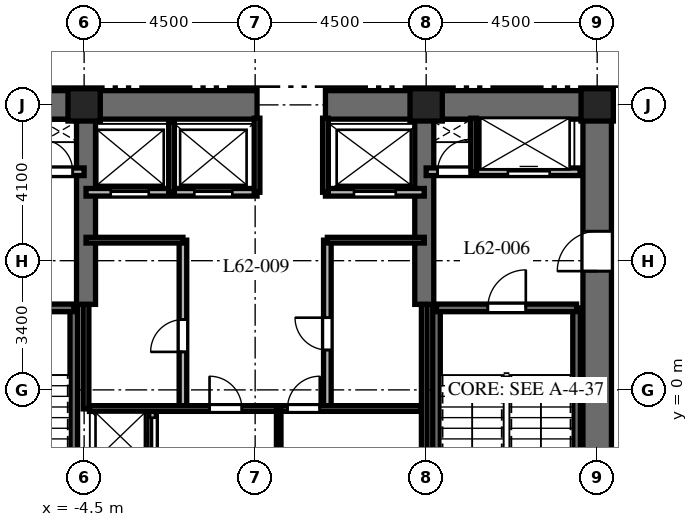
"""IFC4 building model, lengths in metres.
Left out: names, types, materials, properties, quantities, classifications, styles, units other than length and angle.
Written with IfcOpenShell. Run it as: python <this file> out.ifc"""

import sys

from ifc_helpers import new_model, si_unit, direction, frame, frame_2d, origin, origin_2d, place, context, subcontext, project, spatial, rectangle, extrude, element, fill, save


model = new_model("IFC4")
c1 = context("Model", 3, precision=1e-05, world=origin(), true_north=direction((0.0, 1.0)))
c2 = subcontext(c1, "Body", "Model", "MODEL_VIEW")
j1 = project(units=[si_unit("LENGTHUNIT", "METRE"), si_unit("PLANEANGLEUNIT", "RADIAN")], contexts=[c1])
p1 = place(None, origin())
s1 = spatial("IfcSite", under=j1, at=p1, CompositionType="ELEMENT")
p2 = place(p1, origin())
s2 = spatial("IfcBuilding", under=s1, at=p2, CompositionType="ELEMENT")
p3 = place(p2, frame((0.0, 0.0, 248.3)))
s3 = spatial("IfcBuildingStorey", under=s2, at=p3, CompositionType="ELEMENT", Elevation=248.3)
p4 = place(p3, frame((-9.375, 7.5, 0.0), z_axis=(0.0, 0.0, 1.0), x_axis=(1.0, 0.0, 0.0)))
e1 = element("IfcWall", 1, at=p4, inside=s3, PredefinedType="SHEAR", context=c2, shape_type="SweptSolid", body=[
    extrude(rectangle(XDim=9.425, YDim=0.75, at=frame_2d((4.712, 0.0))), origin(), (0.0, 0.0, 1.0), 3.8),
])
p5 = place(p3, frame((1.85, 7.5, 0.0), z_axis=(0.0, 0.0, 1.0), x_axis=(1.0, 0.0, 0.0)))
e2 = element("IfcWall", 2, at=p5, inside=s3, PredefinedType="SHEAR", context=c2, shape_type="SweptSolid", body=[
    extrude(rectangle(XDim=7.525, YDim=0.75, at=frame_2d((3.762, 0.0))), origin(), (0.0, 0.0, 1.0), 3.8),
])
p6 = place(p3, frame((9.0, -7.125, 0.0), z_axis=(0.0, 0.0, 1.0), x_axis=(0.0, 1.0, 0.0)))
e3 = element("IfcWall", 3, at=p6, inside=s3, PredefinedType="SHEAR", context=c2, shape_type="SweptSolid", body=[
    extrude(rectangle(XDim=14.25, YDim=0.75, at=frame_2d((7.125, 0.0))), origin(), (0.0, 0.0, 1.0), 3.8),
])
p7 = place(p6, frame((10.25, 0.0, 0.0)))
e4 = element("IfcOpeningElement", 4, at=p7, cuts=e3, PredefinedType="OPENING", context=c2, shape_type="SweptSolid", body=[
    extrude(rectangle(XDim=1.05, YDim=2.15, at=frame_2d((0.525, 1.075))), frame((0.0, 0.385, 0.0), z_axis=(0.0, -1.0, 0.0), x_axis=(1.0, 0.0, 0.0)), (0.0, 0.0, 1.0), 0.77),
])
for number, where, z_axis, x_axis in (
    (5, (-4.45, 2.25, 0.0), (0.0, 0.0, 1.0), (0.0, 1.0, 0.0)),
    (6, (4.45, 2.25, 0.0), (0.0, 0.0, 1.0), (0.0, 1.0, 0.0)),
):
    element("IfcWall", number, at=place(p3, frame(where, z_axis=z_axis, x_axis=x_axis)), inside=s3, PredefinedType="SHEAR", context=c2, shape_type="SweptSolid", body=[
        extrude(rectangle(XDim=4.875, YDim=0.5, at=frame_2d((2.438, 0.0))), origin(), (0.0, 0.0, 1.0), 3.8),
    ])
p8 = place(p3, frame((-4.772, -6.985, 0.0), z_axis=(0.0, 0.0, 1.0), x_axis=(0.0, 1.0, 0.0)))
e7 = element("IfcWall", 7, at=p8, inside=s3, PredefinedType="SHEAR", context=c2, shape_type="SweptSolid", body=[
    extrude(rectangle(XDim=9.143, YDim=0.2, at=frame_2d((4.572, 0.0))), origin(), (0.0, 0.0, 1.0), 3.8),
])
p9 = place(p3, frame((-8.458, 2.158, 0.0), z_axis=(0.0, 0.0, 1.0), x_axis=(1.0, 0.0, 0.0)))
e8 = element("IfcWall", 8, at=p9, inside=s3, PredefinedType="SHEAR", context=c2, shape_type="SweptSolid", body=[
    extrude(rectangle(XDim=3.686, YDim=0.2, at=frame_2d((1.843, 0.0))), origin(), (0.0, 0.0, 1.0), 3.8),
])
p10 = place(p9, frame((1.3, 0.0, 0.0)))
e9 = element("IfcOpeningElement", 9, at=p10, cuts=e8, PredefinedType="OPENING", context=c2, shape_type="SweptSolid", body=[
    extrude(rectangle(XDim=1.0, YDim=2.15, at=frame_2d((0.5, 1.075))), frame((0.0, 0.11, 0.0), z_axis=(0.0, -1.0, 0.0), x_axis=(1.0, 0.0, 0.0)), (0.0, 0.0, 1.0), 0.22),
])
for number, where, z_axis, x_axis in (
    (10, (4.772, -6.985, 0.0), (0.0, 0.0, 1.0), (0.0, 1.0, 0.0)),
    (11, (8.458, -6.985, 0.0), (0.0, 0.0, 1.0), (0.0, 1.0, 0.0)),
):
    element("IfcWall", number, at=place(p3, frame(where, z_axis=z_axis, x_axis=x_axis)), inside=s3, PredefinedType="SHEAR", context=c2, shape_type="SweptSolid", body=[
        extrude(rectangle(XDim=9.143, YDim=0.2, at=frame_2d((4.572, 0.0))), origin(), (0.0, 0.0, 1.0), 3.8),
    ])
p11 = place(p3, frame((4.772, 2.158, 0.0), z_axis=(0.0, 0.0, 1.0), x_axis=(1.0, 0.0, 0.0)))
e12 = element("IfcWall", 12, at=p11, inside=s3, PredefinedType="SHEAR", context=c2, shape_type="SweptSolid", body=[
    extrude(rectangle(XDim=3.686, YDim=0.2, at=frame_2d((1.843, 0.0))), origin(), (0.0, 0.0, 1.0), 3.8),
])
p12 = place(p11, frame((1.35, 0.0, 0.0)))
e13 = element("IfcOpeningElement", 13, at=p12, cuts=e12, PredefinedType="OPENING", context=c2, shape_type="SweptSolid", body=[
    extrude(rectangle(XDim=1.0, YDim=2.15, at=frame_2d((0.5, 1.075))), frame((0.0, 0.11, 0.0), z_axis=(0.0, -1.0, 0.0), x_axis=(1.0, 0.0, 0.0)), (0.0, 0.0, 1.0), 0.22),
])
for number, where, z_axis, x_axis in (
    (14, (9.0, 7.5, 0.0), (0.0, 0.0, 1.0), (1.0, 0.0, 0.0)),
    (15, (4.5, 7.5, 0.0), (0.0, 0.0, 1.0), (1.0, 0.0, 0.0)),
    (16, (-4.5, 7.5, 0.0), (0.0, 0.0, 1.0), (1.0, 0.0, 0.0)),
):
    element("IfcColumn", number, at=place(p3, frame(where, z_axis=z_axis, x_axis=x_axis)), inside=s3, PredefinedType="COLUMN", context=c2, shape_type="SweptSolid", body=[
        extrude(rectangle(XDim=0.85, YDim=0.85, at=origin_2d()), origin(), (0.0, 0.0, 1.0), 3.8),
    ])
p13 = place(p3, frame((-8.55, 5.74, 0.0), z_axis=(0.0, 0.0, 1.0), x_axis=(1.0, 0.0, 0.0)))
e17 = element("IfcWall", 17, at=p13, inside=s3, PredefinedType="PARTITIONING", context=c2, shape_type="SweptSolid", body=[
    extrude(rectangle(XDim=4.05, YDim=0.2, at=frame_2d((2.025, 0.0))), origin(), (0.0, 0.0, 1.0), 3.5),
])
p14 = place(p13, frame((0.75, 0.0, 0.0)))
e18 = element("IfcOpeningElement", 18, at=p14, cuts=e17, PredefinedType="OPENING", context=c2, shape_type="SweptSolid", body=[
    extrude(rectangle(XDim=1.1, YDim=2.2, at=frame_2d((0.55, 1.1))), frame((0.0, 0.11, 0.0), z_axis=(0.0, -1.0, 0.0), x_axis=(1.0, 0.0, 0.0)), (0.0, 0.0, 1.0), 0.22),
])
p15 = place(p13, frame((2.9, 0.0, 0.0)))
e19 = element("IfcOpeningElement", 19, at=p15, cuts=e17, PredefinedType="OPENING", context=c2, shape_type="SweptSolid", body=[
    extrude(rectangle(XDim=0.85, YDim=2.03, at=frame_2d((0.425, 1.015))), frame((0.0, 0.11, 0.0), z_axis=(0.0, -1.0, 0.0), x_axis=(1.0, 0.0, 0.0)), (0.0, 0.0, 1.0), 0.22),
])
p16 = place(p3, frame((4.5, 5.74, 0.0), z_axis=(0.0, 0.0, 1.0), x_axis=(1.0, 0.0, 0.0)))
e20 = element("IfcWall", 20, at=p16, inside=s3, PredefinedType="PARTITIONING", context=c2, shape_type="SweptSolid", body=[
    extrude(rectangle(XDim=4.05, YDim=0.2, at=frame_2d((2.025, 0.0))), origin(), (0.0, 0.0, 1.0), 3.5),
])
p17 = place(p16, frame((0.3, 0.0, 0.0)))
e21 = element("IfcOpeningElement", 21, at=p17, cuts=e20, PredefinedType="OPENING", context=c2, shape_type="SweptSolid", body=[
    extrude(rectangle(XDim=0.85, YDim=2.03, at=frame_2d((0.425, 1.015))), frame((0.0, 0.11, 0.0), z_axis=(0.0, -1.0, 0.0), x_axis=(1.0, 0.0, 0.0)), (0.0, 0.0, 1.0), 0.22),
])
p18 = place(p16, frame((2.15, 0.0, 0.0)))
e22 = element("IfcOpeningElement", 22, at=p18, cuts=e20, PredefinedType="OPENING", context=c2, shape_type="SweptSolid", body=[
    extrude(rectangle(XDim=1.1, YDim=2.2, at=frame_2d((0.55, 1.1))), frame((0.0, 0.11, 0.0), z_axis=(0.0, -1.0, 0.0), x_axis=(1.0, 0.0, 0.0)), (0.0, 0.0, 1.0), 0.22),
])
p19 = place(p3, frame((5.75, 5.74, 0.0), z_axis=(0.0, 0.0, 1.0), x_axis=(0.0, 1.0, 0.0)))
e23 = element("IfcWall", 23, at=p19, inside=s3, PredefinedType="PARTITIONING", context=c2, shape_type="SweptSolid", body=[
    extrude(rectangle(XDim=1.41, YDim=0.15, at=frame_2d((0.705, 0.0))), origin(), (0.0, 0.0, 1.0), 3.5),
])
p20 = place(p3, frame((-2.7, -1.972, 0.0), z_axis=(0.0, 0.0, 1.0), x_axis=(0.0, 1.0, 0.0)))
e24 = element("IfcWall", 24, at=p20, inside=s3, PredefinedType="PARTITIONING", context=c2, shape_type="SweptSolid", body=[
    extrude(rectangle(XDim=1.472, YDim=0.2, at=frame_2d((0.736, 0.0))), origin(), (0.0, 0.0, 1.0), 3.5),
])
p21 = place(p20, frame((0.24, 0.0, 0.0)))
e25 = element("IfcOpeningElement", 25, at=p21, cuts=e24, PredefinedType="OPENING", context=c2, shape_type="SweptSolid", body=[
    extrude(rectangle(XDim=1.0, YDim=2.2, at=frame_2d((0.5, 1.1))), frame((0.0, 0.11, 0.0), z_axis=(0.0, -1.0, 0.0), x_axis=(1.0, 0.0, 0.0)), (0.0, 0.0, 1.0), 0.22),
])
p22 = place(p3, frame((-4.45, 5.2, 0.0), z_axis=(0.0, 0.0, 1.0), x_axis=(1.0, 0.0, 0.0)))
e26 = element("IfcWall", 26, at=p22, inside=s3, PredefinedType="PARTITIONING", context=c2, shape_type="SweptSolid", body=[
    extrude(rectangle(XDim=4.5, YDim=0.2, at=frame_2d((2.25, 0.0))), origin(), (0.0, 0.0, 1.0), 3.5),
])
p23 = place(p22, frame((0.65, 0.0, 0.0)))
e27 = element("IfcOpeningElement", 27, at=p23, cuts=e26, PredefinedType="OPENING", context=c2, shape_type="SweptSolid", body=[
    extrude(rectangle(XDim=1.0, YDim=2.2, at=frame_2d((0.5, 1.1))), frame((0.0, 0.11, 0.0), z_axis=(0.0, -1.0, 0.0), x_axis=(1.0, 0.0, 0.0)), (0.0, 0.0, 1.0), 0.22),
])
p24 = place(p22, frame((2.85, 0.0, 0.0)))
e28 = element("IfcOpeningElement", 28, at=p24, cuts=e26, PredefinedType="OPENING", context=c2, shape_type="SweptSolid", body=[
    extrude(rectangle(XDim=1.0, YDim=2.2, at=frame_2d((0.5, 1.1))), frame((0.0, 0.11, 0.0), z_axis=(0.0, -1.0, 0.0), x_axis=(1.0, 0.0, 0.0)), (0.0, 0.0, 1.0), 0.22),
])
p25 = place(p3, frame((1.85, 5.2, 0.0), z_axis=(0.0, 0.0, 1.0), x_axis=(1.0, 0.0, 0.0)))
e29 = element("IfcWall", 29, at=p25, inside=s3, PredefinedType="PARTITIONING", context=c2, shape_type="SweptSolid", body=[
    extrude(rectangle(XDim=2.6, YDim=0.2, at=frame_2d((1.3, 0.0))), origin(), (0.0, 0.0, 1.0), 3.5),
])
p26 = place(p25, frame((0.75, 0.0, 0.0)))
e30 = element("IfcOpeningElement", 30, at=p26, cuts=e29, PredefinedType="OPENING", context=c2, shape_type="SweptSolid", body=[
    extrude(rectangle(XDim=1.1, YDim=2.2, at=frame_2d((0.55, 1.1))), frame((0.0, 0.11, 0.0), z_axis=(0.0, -1.0, 0.0), x_axis=(1.0, 0.0, 0.0)), (0.0, 0.0, 1.0), 0.22),
])
p27 = place(p3, frame((-2.2, 5.2, 0.0), z_axis=(0.0, 0.0, 1.0), x_axis=(0.0, 1.0, 0.0)))
e31 = element("IfcWall", 31, at=p27, inside=s3, PredefinedType="PARTITIONING", context=c2, shape_type="SweptSolid", body=[
    extrude(rectangle(XDim=1.85, YDim=0.15, at=frame_2d((0.925, 0.0))), origin(), (0.0, 0.0, 1.0), 3.5),
])
for number, where, z_axis, x_axis in (
    (32, (0.05, 5.2, 0.0), (0.0, 0.0, 1.0), (0.0, 1.0, 0.0)),
    (33, (1.85, 5.2, 0.0), (0.0, 0.0, 1.0), (0.0, 1.0, 0.0)),
):
    element("IfcWall", number, at=place(p3, frame(where, z_axis=z_axis, x_axis=x_axis)), inside=s3, PredefinedType="PARTITIONING", context=c2, shape_type="SweptSolid", body=[
        extrude(rectangle(XDim=1.95, YDim=0.15, at=frame_2d((0.975, 0.0))), origin(), (0.0, 0.0, 1.0), 3.5),
    ])
p28 = place(p3, frame((-4.45, -0.5, 0.0), z_axis=(0.0, 0.0, 1.0), x_axis=(0.0, 1.0, 0.0)))
e34 = element("IfcWall", 34, at=p28, inside=s3, PredefinedType="PARTITIONING", context=c2, shape_type="SweptSolid", body=[
    extrude(rectangle(XDim=2.75, YDim=0.15, at=frame_2d((1.375, 0.0))), origin(), (0.0, 0.0, 1.0), 3.5),
])
p29 = place(p3, frame((4.45, -1.972, 0.0), z_axis=(0.0, 0.0, 1.0), x_axis=(0.0, 1.0, 0.0)))
e35 = element("IfcWall", 35, at=p29, inside=s3, PredefinedType="PARTITIONING", context=c2, shape_type="SweptSolid", body=[
    extrude(rectangle(XDim=4.222, YDim=0.15, at=frame_2d((2.111, 0.0))), origin(), (0.0, 0.0, 1.0), 3.5),
])
p30 = place(p3, frame((-1.9, -0.5, 0.0), z_axis=(0.0, 0.0, 1.0), x_axis=(0.0, 1.0, 0.0)))
e36 = element("IfcWall", 36, at=p30, inside=s3, PredefinedType="PARTITIONING", context=c2, shape_type="SweptSolid", body=[
    extrude(rectangle(XDim=4.44, YDim=0.2, at=frame_2d((2.22, 0.0))), origin(), (0.0, 0.0, 1.0), 3.5),
])
p31 = place(p30, frame((1.5, 0.0, 0.0)))
e37 = element("IfcOpeningElement", 37, at=p31, cuts=e36, PredefinedType="OPENING", context=c2, shape_type="SweptSolid", body=[
    extrude(rectangle(XDim=0.85, YDim=2.03, at=frame_2d((0.425, 1.015))), frame((0.0, 0.11, 0.0), z_axis=(0.0, -1.0, 0.0), x_axis=(1.0, 0.0, 0.0)), (0.0, 0.0, 1.0), 0.22),
])
p32 = place(p3, frame((-4.45, 3.94, 0.0), z_axis=(0.0, 0.0, 1.0), x_axis=(1.0, 0.0, 0.0)))
e38 = element("IfcWall", 38, at=p32, inside=s3, PredefinedType="PARTITIONING", context=c2, shape_type="SweptSolid", body=[
    extrude(rectangle(XDim=2.55, YDim=0.15, at=frame_2d((1.275, 0.0))), origin(), (0.0, 0.0, 1.0), 3.5),
])
p33 = place(p3, frame((1.9, -0.5, 0.0), z_axis=(0.0, 0.0, 1.0), x_axis=(0.0, 1.0, 0.0)))
e39 = element("IfcWall", 39, at=p33, inside=s3, PredefinedType="PARTITIONING", context=c2, shape_type="SweptSolid", body=[
    extrude(rectangle(XDim=4.44, YDim=0.2, at=frame_2d((2.22, 0.0))), origin(), (0.0, 0.0, 1.0), 3.5),
])
p34 = place(p33, frame((1.55, 0.0, 0.0)))
e40 = element("IfcOpeningElement", 40, at=p34, cuts=e39, PredefinedType="OPENING", context=c2, shape_type="SweptSolid", body=[
    extrude(rectangle(XDim=0.85, YDim=2.03, at=frame_2d((0.425, 1.015))), frame((0.0, 0.11, 0.0), z_axis=(0.0, -1.0, 0.0), x_axis=(1.0, 0.0, 0.0)), (0.0, 0.0, 1.0), 0.22),
])
p35 = place(p3, frame((1.9, 3.94, 0.0), z_axis=(0.0, 0.0, 1.0), x_axis=(1.0, 0.0, 0.0)))
e41 = element("IfcWall", 41, at=p35, inside=s3, PredefinedType="PARTITIONING", context=c2, shape_type="SweptSolid", body=[
    extrude(rectangle(XDim=2.55, YDim=0.15, at=frame_2d((1.275, 0.0))), origin(), (0.0, 0.0, 1.0), 3.5),
])
p36 = place(p3, frame((-4.36, -0.49, 0.0), z_axis=(0.0, 0.0, 1.0), x_axis=(1.0, 0.0, 0.0)))
e42 = element("IfcWall", 42, at=p36, inside=s3, PredefinedType="PARTITIONING", context=c2, shape_type="SweptSolid", body=[
    extrude(rectangle(XDim=8.72, YDim=0.15, at=frame_2d((4.36, 0.0))), origin(), (0.0, 0.0, 1.0), 3.5),
])
p37 = place(p36, frame((3.16, 0.0, 0.0)))
e43 = element("IfcOpeningElement", 43, at=p37, cuts=e42, PredefinedType="OPENING", context=c2, shape_type="SweptSolid", body=[
    extrude(rectangle(XDim=0.85, YDim=2.03, at=frame_2d((0.425, 1.015))), frame((0.0, 0.085, 0.0), z_axis=(0.0, -1.0, 0.0), x_axis=(1.0, 0.0, 0.0)), (0.0, 0.0, 1.0), 0.17),
])
p38 = place(p36, frame((5.21, 0.0, 0.0)))
e44 = element("IfcOpeningElement", 44, at=p38, cuts=e42, PredefinedType="OPENING", context=c2, shape_type="SweptSolid", body=[
    extrude(rectangle(XDim=0.85, YDim=2.03, at=frame_2d((0.425, 1.015))), frame((0.0, 0.085, 0.0), z_axis=(0.0, -1.0, 0.0), x_axis=(1.0, 0.0, 0.0)), (0.0, 0.0, 1.0), 0.17),
])
p39 = place(p3, frame((0.62, -1.972, 0.0), z_axis=(0.0, 0.0, 1.0), x_axis=(0.0, 1.0, 0.0)))
e45 = element("IfcWall", 45, at=p39, inside=s3, PredefinedType="PARTITIONING", context=c2, shape_type="SweptSolid", body=[
    extrude(rectangle(XDim=1.472, YDim=0.12, at=frame_2d((0.736, 0.0))), origin(), (0.0, 0.0, 1.0), 3.5),
])
p40 = place(p12, origin())
e46 = element("IfcDoor", 46, at=p40, inside=s3, OperationType="SINGLE_SWING_RIGHT", PredefinedType="DOOR", context=c2, shape_type="SweptSolid", body=[
    extrude(rectangle(XDim=1.0, YDim=2.15, at=frame_2d((0.5, 1.075))), frame((0.0, 0.025, 0.0), z_axis=(0.0, -1.0, 0.0), x_axis=(1.0, 0.0, 0.0)), (0.0, 0.0, 1.0), 0.05),
])
fill(e13, e46)
p41 = place(p7, origin())
e47 = element("IfcDoor", 47, at=p41, inside=s3, OperationType="SINGLE_SWING_LEFT", PredefinedType="DOOR", context=c2, shape_type="SweptSolid", body=[
    extrude(rectangle(XDim=1.05, YDim=2.15, at=frame_2d((0.525, 1.075))), frame((0.0, 0.025, 0.0), z_axis=(0.0, -1.0, 0.0), x_axis=(1.0, 0.0, 0.0)), (0.0, 0.0, 1.0), 0.05),
])
fill(e4, e47)
p42 = place(p15, origin())
e48 = element("IfcDoor", 48, at=p42, inside=s3, OperationType="SINGLE_SWING_LEFT", PredefinedType="DOOR", context=c2, shape_type="SweptSolid", body=[
    extrude(rectangle(XDim=0.85, YDim=2.03, at=frame_2d((0.425, 1.015))), frame((0.0, 0.025, 0.0), z_axis=(0.0, -1.0, 0.0), x_axis=(1.0, 0.0, 0.0)), (0.0, 0.0, 1.0), 0.05),
])
fill(e19, e48)
p43 = place(p17, origin())
e49 = element("IfcDoor", 49, at=p43, inside=s3, OperationType="SINGLE_SWING_RIGHT", PredefinedType="DOOR", context=c2, shape_type="SweptSolid", body=[
    extrude(rectangle(XDim=0.85, YDim=2.03, at=frame_2d((0.425, 1.015))), frame((0.0, 0.025, 0.0), z_axis=(0.0, -1.0, 0.0), x_axis=(1.0, 0.0, 0.0)), (0.0, 0.0, 1.0), 0.05),
])
fill(e21, e49)
p44 = place(p18, origin())
e50 = element("IfcDoor", 50, at=p44, inside=s3, OperationType="SLIDING_TO_RIGHT", PredefinedType="DOOR", context=c2, shape_type="SweptSolid", body=[
    extrude(rectangle(XDim=1.1, YDim=2.2, at=frame_2d((0.55, 1.1))), frame((0.0, 0.025, 0.0), z_axis=(0.0, -1.0, 0.0), x_axis=(1.0, 0.0, 0.0)), (0.0, 0.0, 1.0), 0.05),
])
fill(e22, e50)
p45 = place(p21, origin())
e51 = element("IfcDoor", 51, at=p45, inside=s3, OperationType="SLIDING_TO_LEFT", PredefinedType="DOOR", context=c2, shape_type="SweptSolid", body=[
    extrude(rectangle(XDim=1.0, YDim=2.2, at=frame_2d((0.5, 1.1))), frame((0.0, 0.025, 0.0), z_axis=(0.0, -1.0, 0.0), x_axis=(1.0, 0.0, 0.0)), (0.0, 0.0, 1.0), 0.05),
])
fill(e25, e51)
p46 = place(p23, origin())
e52 = element("IfcDoor", 52, at=p46, inside=s3, OperationType="SLIDING_TO_LEFT", PredefinedType="DOOR", context=c2, shape_type="SweptSolid", body=[
    extrude(rectangle(XDim=1.0, YDim=2.2, at=frame_2d((0.5, 1.1))), frame((0.0, 0.025, 0.0), z_axis=(0.0, -1.0, 0.0), x_axis=(1.0, 0.0, 0.0)), (0.0, 0.0, 1.0), 0.05),
])
fill(e27, e52)
p47 = place(p24, origin())
e53 = element("IfcDoor", 53, at=p47, inside=s3, OperationType="SLIDING_TO_RIGHT", PredefinedType="DOOR", context=c2, shape_type="SweptSolid", body=[
    extrude(rectangle(XDim=1.0, YDim=2.2, at=frame_2d((0.5, 1.1))), frame((0.0, 0.025, 0.0), z_axis=(0.0, -1.0, 0.0), x_axis=(1.0, 0.0, 0.0)), (0.0, 0.0, 1.0), 0.05),
])
fill(e28, e53)
p48 = place(p26, origin())
e54 = element("IfcDoor", 54, at=p48, inside=s3, OperationType="SLIDING_TO_RIGHT", PredefinedType="DOOR", context=c2, shape_type="SweptSolid", body=[
    extrude(rectangle(XDim=1.1, YDim=2.2, at=frame_2d((0.55, 1.1))), frame((0.0, 0.025, 0.0), z_axis=(0.0, -1.0, 0.0), x_axis=(1.0, 0.0, 0.0)), (0.0, 0.0, 1.0), 0.05),
])
fill(e30, e54)
p49 = place(p31, origin())
e55 = element("IfcDoor", 55, at=p49, inside=s3, OperationType="SINGLE_SWING_LEFT", PredefinedType="DOOR", context=c2, shape_type="SweptSolid", body=[
    extrude(rectangle(XDim=0.85, YDim=2.03, at=frame_2d((0.425, 1.015))), frame((0.0, 0.025, 0.0), z_axis=(0.0, -1.0, 0.0), x_axis=(1.0, 0.0, 0.0)), (0.0, 0.0, 1.0), 0.05),
])
fill(e37, e55)
p50 = place(p34, origin())
e56 = element("IfcDoor", 56, at=p50, inside=s3, OperationType="SINGLE_SWING_RIGHT", PredefinedType="DOOR", context=c2, shape_type="SweptSolid", body=[
    extrude(rectangle(XDim=0.85, YDim=2.03, at=frame_2d((0.425, 1.015))), frame((0.0, 0.025, 0.0), z_axis=(0.0, -1.0, 0.0), x_axis=(1.0, 0.0, 0.0)), (0.0, 0.0, 1.0), 0.05),
])
fill(e40, e56)
p51 = place(p37, origin())
e57 = element("IfcDoor", 57, at=p51, inside=s3, OperationType="SINGLE_SWING_LEFT", PredefinedType="DOOR", context=c2, shape_type="SweptSolid", body=[
    extrude(rectangle(XDim=0.85, YDim=2.03, at=frame_2d((0.425, 1.015))), frame((0.0, 0.025, 0.0), z_axis=(0.0, -1.0, 0.0), x_axis=(1.0, 0.0, 0.0)), (0.0, 0.0, 1.0), 0.05),
])
fill(e43, e57)
p52 = place(p38, origin())
e58 = element("IfcDoor", 58, at=p52, inside=s3, OperationType="SINGLE_SWING_RIGHT", PredefinedType="DOOR", context=c2, shape_type="SweptSolid", body=[
    extrude(rectangle(XDim=0.85, YDim=2.03, at=frame_2d((0.425, 1.015))), frame((0.0, 0.025, 0.0), z_axis=(0.0, -1.0, 0.0), x_axis=(1.0, 0.0, 0.0)), (0.0, 0.0, 1.0), 0.05),
])
fill(e44, e58)
save(model, sys.argv[1])
